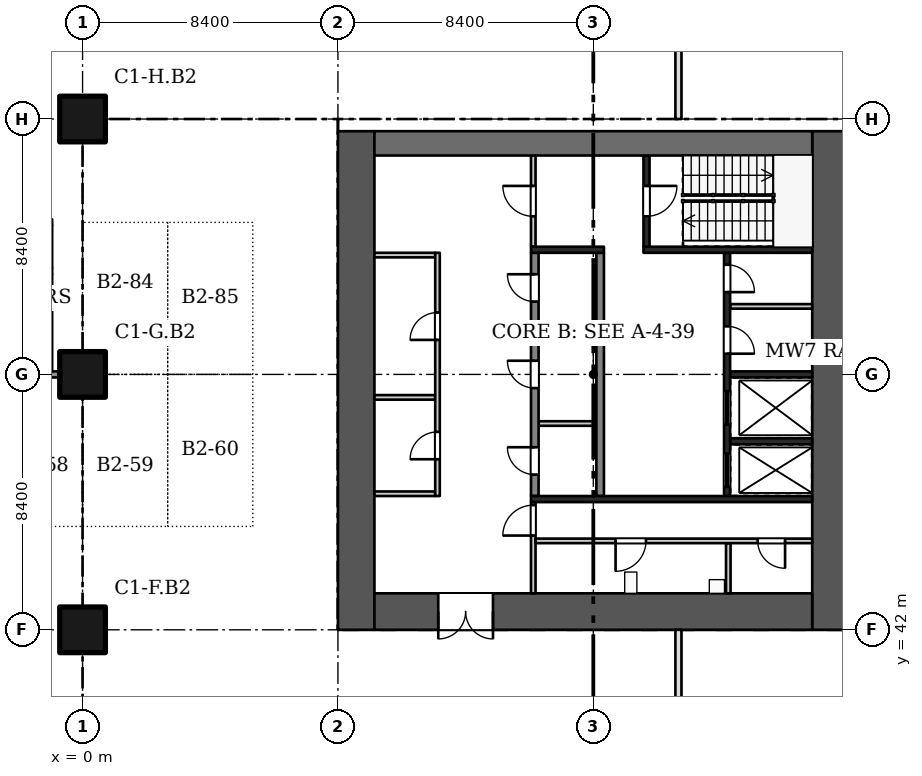
"""IFC4 building model, lengths in metres.
Left out: names, types, materials, properties, quantities, classifications, styles, units other than length and angle.
Written with IfcOpenShell. Run it as: python <this file> out.ifc"""

import sys

from ifc_helpers import new_model, si_unit, direction, frame, frame_2d, origin, origin_2d, place, context, subcontext, project, spatial, rectangle, extrude, element, fill, save


model = new_model("IFC4")
c1 = context("Model", 3, precision=1e-05, world=origin(), true_north=direction((0.0, 1.0)))
c2 = subcontext(c1, "Body", "Model", "MODEL_VIEW")
j1 = project(units=[si_unit("LENGTHUNIT", "METRE"), si_unit("PLANEANGLEUNIT", "RADIAN")], contexts=[c1])
p1 = place(None, origin())
s1 = spatial("IfcSite", under=j1, at=p1, CompositionType="ELEMENT")
p2 = place(p1, origin())
s2 = spatial("IfcBuilding", under=s1, at=p2, CompositionType="ELEMENT")
p3 = place(p2, frame((0.0, 0.0, -8.0)))
s3 = spatial("IfcBuildingStorey", under=s2, at=p3, CompositionType="ELEMENT", Elevation=-8.0)
for number, where, z_axis, x_axis in (
    (1, (0.0, 42.0, 0.0), (0.0, 0.0, 1.0), (1.0, 0.0, 0.0)),
    (2, (0.0, 50.4, 0.0), (0.0, 0.0, 1.0), (1.0, 0.0, 0.0)),
    (3, (0.0, 58.8, 0.0), (0.0, 0.0, 1.0), (1.0, 0.0, 0.0)),
):
    element("IfcColumn", number, at=place(p3, frame(where, z_axis=z_axis, x_axis=x_axis)), inside=s3, PredefinedType="COLUMN", context=c2, shape_type="SweptSolid", body=[
        extrude(rectangle(XDim=1.5, YDim=1.5, at=origin_2d()), origin(), (0.0, 0.0, 1.0), 3.7),
    ])
for number, where, z_axis, x_axis in (
    (4, (9.0, 58.4, 0.0), (0.0, 0.0, 1.0), (0.0, -1.0, 0.0)),
    (5, (24.6, 58.4, 0.0), (0.0, 0.0, 1.0), (0.0, -1.0, 0.0)),
):
    element("IfcWall", number, at=place(p3, frame(where, z_axis=z_axis, x_axis=x_axis)), inside=s3, PredefinedType="SHEAR", context=c2, shape_type="SweptSolid", body=[
        extrude(rectangle(XDim=16.4, YDim=1.2, at=frame_2d((8.2, 0.0))), origin(), (0.0, 0.0, 1.0), 3.7),
    ])
p4 = place(p3, frame((9.6, 58.0, 0.0), z_axis=(0.0, 0.0, 1.0), x_axis=(1.0, 0.0, 0.0)))
e6 = element("IfcWall", 6, at=p4, inside=s3, PredefinedType="SHEAR", context=c2, shape_type="SweptSolid", body=[
    extrude(rectangle(XDim=14.4, YDim=0.8, at=frame_2d((7.2, 0.0))), origin(), (0.0, 0.0, 1.0), 3.7),
])
p5 = place(p3, frame((9.6, 42.6, 0.0), z_axis=(0.0, 0.0, 1.0), x_axis=(1.0, 0.0, 0.0)))
e7 = element("IfcWall", 7, at=p5, inside=s3, PredefinedType="SHEAR", context=c2, shape_type="SweptSolid", body=[
    extrude(rectangle(XDim=14.4, YDim=1.2, at=frame_2d((7.2, 0.0))), origin(), (0.0, 0.0, 1.0), 3.7),
])
p6 = place(p5, frame((2.1, 0.0, 0.0)))
e8 = element("IfcOpeningElement", 8, at=p6, cuts=e7, PredefinedType="OPENING", context=c2, shape_type="SweptSolid", body=[
    extrude(rectangle(XDim=1.8, YDim=2.1, at=frame_2d((0.9, 1.05))), frame((0.0, 0.61, 0.0), z_axis=(0.0, -1.0, 0.0), x_axis=(1.0, 0.0, 0.0)), (0.0, 0.0, 1.0), 1.22),
])
for number, where, z_axis, x_axis in (
    (9, (9.6, 54.325, 0.0), (0.0, 0.0, 1.0), (1.0, 0.0, 0.0)),
    (10, (9.6, 46.475, 0.0), (0.0, 0.0, 1.0), (1.0, 0.0, 0.0)),
    (11, (9.6, 49.645, 0.0), (0.0, 0.0, 1.0), (1.0, 0.0, 0.0)),
):
    element("IfcWall", number, at=place(p3, frame(where, z_axis=z_axis, x_axis=x_axis)), inside=s3, PredefinedType="PARTITIONING", context=c2, shape_type="SweptSolid", body=[
        extrude(rectangle(XDim=2.0, YDim=0.15, at=frame_2d((1.0, 0.0))), origin(), (0.0, 0.0, 1.0), 3.7),
    ])
p7 = place(p3, frame((11.675, 54.4, 0.0), z_axis=(0.0, 0.0, 1.0), x_axis=(0.0, -1.0, 0.0)))
e12 = element("IfcWall", 12, at=p7, inside=s3, PredefinedType="PARTITIONING", context=c2, shape_type="SweptSolid", body=[
    extrude(rectangle(XDim=8.0, YDim=0.15, at=frame_2d((4.0, 0.0))), origin(), (0.0, 0.0, 1.0), 3.7),
])
p8 = place(p7, frame((1.965, 0.0, 0.0)))
e13 = element("IfcOpeningElement", 13, at=p8, cuts=e12, PredefinedType="OPENING", context=c2, shape_type="SweptSolid", body=[
    extrude(rectangle(XDim=0.9, YDim=2.1, at=frame_2d((0.45, 1.05))), frame((0.0, 0.085, 0.0), z_axis=(0.0, -1.0, 0.0), x_axis=(1.0, 0.0, 0.0)), (0.0, 0.0, 1.0), 0.17),
])
p9 = place(p7, frame((5.89, 0.0, 0.0)))
e14 = element("IfcOpeningElement", 14, at=p9, cuts=e12, PredefinedType="OPENING", context=c2, shape_type="SweptSolid", body=[
    extrude(rectangle(XDim=0.9, YDim=2.1, at=frame_2d((0.45, 1.05))), frame((0.0, 0.085, 0.0), z_axis=(0.0, -1.0, 0.0), x_axis=(1.0, 0.0, 0.0)), (0.0, 0.0, 1.0), 0.17),
])
for number, where, z_axis, x_axis in (
    (15, (15.0, 52.015, 0.0), (0.0, 0.0, 1.0), (1.0, 0.0, 0.0)),
    (16, (15.0, 48.785, 0.0), (0.0, 0.0, 1.0), (1.0, 0.0, 0.0)),
):
    element("IfcWall", number, at=place(p3, frame(where, z_axis=z_axis, x_axis=x_axis)), inside=s3, PredefinedType="PARTITIONING", context=c2, shape_type="SweptSolid", body=[
        extrude(rectangle(XDim=1.9, YDim=0.15, at=frame_2d((0.95, 0.0))), origin(), (0.0, 0.0, 1.0), 3.7),
    ])
p10 = place(p3, frame((14.875, 54.4, 0.0), z_axis=(0.0, 0.0, 1.0), x_axis=(0.0, -1.0, 0.0)))
e17 = element("IfcWall", 17, at=p10, inside=s3, PredefinedType="SHEAR", context=c2, shape_type="SweptSolid", body=[
    extrude(rectangle(XDim=8.0, YDim=0.25, at=frame_2d((4.0, 0.0))), origin(), (0.0, 0.0, 1.0), 3.7),
])
p11 = place(p10, frame((0.705, 0.0, 0.0)))
e18 = element("IfcOpeningElement", 18, at=p11, cuts=e17, PredefinedType="OPENING", context=c2, shape_type="SweptSolid", body=[
    extrude(rectangle(XDim=0.9, YDim=2.1, at=frame_2d((0.45, 1.05))), frame((0.0, 0.135, 0.0), z_axis=(0.0, -1.0, 0.0), x_axis=(1.0, 0.0, 0.0)), (0.0, 0.0, 1.0), 0.27),
])
p12 = place(p10, frame((3.55, 0.0, 0.0)))
e19 = element("IfcOpeningElement", 19, at=p12, cuts=e17, PredefinedType="OPENING", context=c2, shape_type="SweptSolid", body=[
    extrude(rectangle(XDim=0.9, YDim=2.1, at=frame_2d((0.45, 1.05))), frame((0.0, 0.135, 0.0), z_axis=(0.0, -1.0, 0.0), x_axis=(1.0, 0.0, 0.0)), (0.0, 0.0, 1.0), 0.27),
])
p13 = place(p10, frame((6.395, 0.0, 0.0)))
e20 = element("IfcOpeningElement", 20, at=p13, cuts=e17, PredefinedType="OPENING", context=c2, shape_type="SweptSolid", body=[
    extrude(rectangle(XDim=0.9, YDim=2.1, at=frame_2d((0.45, 1.05))), frame((0.0, 0.135, 0.0), z_axis=(0.0, -1.0, 0.0), x_axis=(1.0, 0.0, 0.0)), (0.0, 0.0, 1.0), 0.27),
])
p14 = place(p3, frame((17.025, 54.4, 0.0), z_axis=(0.0, 0.0, 1.0), x_axis=(0.0, -1.0, 0.0)))
e21 = element("IfcWall", 21, at=p14, inside=s3, PredefinedType="SHEAR", context=c2, shape_type="SweptSolid", body=[
    extrude(rectangle(XDim=8.0, YDim=0.25, at=frame_2d((4.0, 0.0))), origin(), (0.0, 0.0, 1.0), 3.7),
])
for number, where, z_axis, x_axis in (
    (22, (21.3, 50.4, 0.0), (0.0, 0.0, 1.0), (1.0, 0.0, 0.0)),
    (23, (21.3, 48.2, 0.0), (0.0, 0.0, 1.0), (1.0, 0.0, 0.0)),
):
    element("IfcWall", number, at=place(p3, frame(where, z_axis=z_axis, x_axis=x_axis)), inside=s3, PredefinedType="SHEAR", context=c2, shape_type="SweptSolid", body=[
        extrude(rectangle(XDim=2.7, YDim=0.2, at=frame_2d((1.35, 0.0))), origin(), (0.0, 0.0, 1.0), 3.7),
    ])
p15 = place(p3, frame((21.3, 52.637, 0.0), z_axis=(0.0, 0.0, 1.0), x_axis=(1.0, 0.0, 0.0)))
e24 = element("IfcWall", 24, at=p15, inside=s3, PredefinedType="PARTITIONING", context=c2, shape_type="SweptSolid", body=[
    extrude(rectangle(XDim=2.7, YDim=0.15, at=frame_2d((1.35, 0.0))), origin(), (0.0, 0.0, 1.0), 3.7),
])
p16 = place(p3, frame((21.2, 54.4, 0.0), z_axis=(0.0, 0.0, 1.0), x_axis=(0.0, -1.0, 0.0)))
e25 = element("IfcWall", 25, at=p16, inside=s3, PredefinedType="SHEAR", context=c2, shape_type="SweptSolid", body=[
    extrude(rectangle(XDim=8.0, YDim=0.2, at=frame_2d((4.0, 0.0))), origin(), (0.0, 0.0, 1.0), 3.7),
])
p17 = place(p16, frame((0.394, 0.0, 0.0)))
e26 = element("IfcOpeningElement", 26, at=p17, cuts=e25, PredefinedType="OPENING", context=c2, shape_type="SweptSolid", body=[
    extrude(rectangle(XDim=0.9, YDim=2.1, at=frame_2d((0.45, 1.05))), frame((0.0, 0.11, 0.0), z_axis=(0.0, -1.0, 0.0), x_axis=(1.0, 0.0, 0.0)), (0.0, 0.0, 1.0), 0.22),
])
p18 = place(p16, frame((2.419, 0.0, 0.0)))
e27 = element("IfcOpeningElement", 27, at=p18, cuts=e25, PredefinedType="OPENING", context=c2, shape_type="SweptSolid", body=[
    extrude(rectangle(XDim=0.9, YDim=2.1, at=frame_2d((0.45, 1.05))), frame((0.0, 0.11, 0.0), z_axis=(0.0, -1.0, 0.0), x_axis=(1.0, 0.0, 0.0)), (0.0, 0.0, 1.0), 0.22),
])
p19 = place(p16, frame((4.55, 0.0, 0.0)))
e28 = element("IfcOpeningElement", 28, at=p19, cuts=e25, PredefinedType="OPENING", context=c2, shape_type="SweptSolid", body=[
    extrude(rectangle(XDim=1.1, YDim=2.1, at=frame_2d((0.55, 1.05))), frame((0.0, 0.11, 0.0), z_axis=(0.0, -1.0, 0.0), x_axis=(1.0, 0.0, 0.0)), (0.0, 0.0, 1.0), 0.22),
])
p20 = place(p16, frame((6.6, 0.0, 0.0)))
e29 = element("IfcOpeningElement", 29, at=p20, cuts=e25, PredefinedType="OPENING", context=c2, shape_type="SweptSolid", body=[
    extrude(rectangle(XDim=1.1, YDim=2.1, at=frame_2d((0.55, 1.05))), frame((0.0, 0.11, 0.0), z_axis=(0.0, -1.0, 0.0), x_axis=(1.0, 0.0, 0.0)), (0.0, 0.0, 1.0), 0.22),
])
p21 = place(p3, frame((14.75, 54.5, 0.0), z_axis=(0.0, 0.0, 1.0), x_axis=(1.0, 0.0, 0.0)))
e30 = element("IfcWall", 30, at=p21, inside=s3, PredefinedType="SHEAR", context=c2, shape_type="SweptSolid", body=[
    extrude(rectangle(XDim=2.4, YDim=0.2, at=frame_2d((1.2, 0.0))), origin(), (0.0, 0.0, 1.0), 3.7),
])
p22 = place(p3, frame((18.45, 54.5, 0.0), z_axis=(0.0, 0.0, 1.0), x_axis=(1.0, 0.0, 0.0)))
e31 = element("IfcWall", 31, at=p22, inside=s3, PredefinedType="SHEAR", context=c2, shape_type="SweptSolid", body=[
    extrude(rectangle(XDim=5.55, YDim=0.2, at=frame_2d((2.775, 0.0))), origin(), (0.0, 0.0, 1.0), 3.7),
])
p23 = place(p3, frame((14.825, 57.6, 0.0), z_axis=(0.0, 0.0, 1.0), x_axis=(0.0, -1.0, 0.0)))
e32 = element("IfcWall", 32, at=p23, inside=s3, PredefinedType="PARTITIONING", context=c2, shape_type="SweptSolid", body=[
    extrude(rectangle(XDim=3.0, YDim=0.15, at=frame_2d((1.5, 0.0))), origin(), (0.0, 0.0, 1.0), 3.7),
])
p24 = place(p23, frame((1.0, 0.0, 0.0)))
e33 = element("IfcOpeningElement", 33, at=p24, cuts=e32, PredefinedType="OPENING", context=c2, shape_type="SweptSolid", body=[
    extrude(rectangle(XDim=1.0, YDim=2.1, at=frame_2d((0.5, 1.05))), frame((0.0, 0.085, 0.0), z_axis=(0.0, -1.0, 0.0), x_axis=(1.0, 0.0, 0.0)), (0.0, 0.0, 1.0), 0.17),
])
p25 = place(p3, frame((18.55, 57.6, 0.0), z_axis=(0.0, 0.0, 1.0), x_axis=(0.0, -1.0, 0.0)))
e34 = element("IfcWall", 34, at=p25, inside=s3, PredefinedType="SHEAR", context=c2, shape_type="SweptSolid", body=[
    extrude(rectangle(XDim=3.0, YDim=0.2, at=frame_2d((1.5, 0.0))), origin(), (0.0, 0.0, 1.0), 3.7),
])
p26 = place(p25, frame((1.0, 0.0, 0.0)))
e35 = element("IfcOpeningElement", 35, at=p26, cuts=e34, PredefinedType="OPENING", context=c2, shape_type="SweptSolid", body=[
    extrude(rectangle(XDim=1.0, YDim=2.1, at=frame_2d((0.5, 1.05))), frame((0.0, 0.11, 0.0), z_axis=(0.0, -1.0, 0.0), x_axis=(1.0, 0.0, 0.0)), (0.0, 0.0, 1.0), 0.22),
])
p27 = place(p3, frame((14.75, 46.3, 0.0), z_axis=(0.0, 0.0, 1.0), x_axis=(1.0, 0.0, 0.0)))
e36 = element("IfcWall", 36, at=p27, inside=s3, PredefinedType="SHEAR", context=c2, shape_type="SweptSolid", body=[
    extrude(rectangle(XDim=9.25, YDim=0.2, at=frame_2d((4.625, 0.0))), origin(), (0.0, 0.0, 1.0), 3.7),
])
p28 = place(p3, frame((14.825, 46.2, 0.0), z_axis=(0.0, 0.0, 1.0), x_axis=(0.0, -1.0, 0.0)))
e37 = element("IfcWall", 37, at=p28, inside=s3, PredefinedType="PARTITIONING", context=c2, shape_type="SweptSolid", body=[
    extrude(rectangle(XDim=3.0, YDim=0.15, at=frame_2d((1.5, 0.0))), origin(), (0.0, 0.0, 1.0), 3.7),
])
p29 = place(p28, frame((0.1, 0.0, 0.0)))
e38 = element("IfcOpeningElement", 38, at=p29, cuts=e37, PredefinedType="OPENING", context=c2, shape_type="SweptSolid", body=[
    extrude(rectangle(XDim=1.0, YDim=2.1, at=frame_2d((0.5, 1.05))), frame((0.0, 0.085, 0.0), z_axis=(0.0, -1.0, 0.0), x_axis=(1.0, 0.0, 0.0)), (0.0, 0.0, 1.0), 0.17),
])
p30 = place(p3, frame((21.24, 44.85, 0.0), z_axis=(0.0, 0.0, 1.0), x_axis=(0.0, -1.0, 0.0)))
e39 = element("IfcWall", 39, at=p30, inside=s3, PredefinedType="PARTITIONING", context=c2, shape_type="SweptSolid", body=[
    extrude(rectangle(XDim=1.65, YDim=0.15, at=frame_2d((0.825, 0.0))), origin(), (0.0, 0.0, 1.0), 3.7),
])
p31 = place(p3, frame((14.9, 44.925, 0.0), z_axis=(0.0, 0.0, 1.0), x_axis=(1.0, 0.0, 0.0)))
e40 = element("IfcWall", 40, at=p31, inside=s3, PredefinedType="PARTITIONING", context=c2, shape_type="SweptSolid", body=[
    extrude(rectangle(XDim=9.1, YDim=0.15, at=frame_2d((4.55, 0.0))), origin(), (0.0, 0.0, 1.0), 3.7),
])
p32 = place(p31, frame((2.633, 0.0, 0.0)))
e41 = element("IfcOpeningElement", 41, at=p32, cuts=e40, PredefinedType="OPENING", context=c2, shape_type="SweptSolid", body=[
    extrude(rectangle(XDim=1.0, YDim=2.1, at=frame_2d((0.5, 1.05))), frame((0.0, 0.085, 0.0), z_axis=(0.0, -1.0, 0.0), x_axis=(1.0, 0.0, 0.0)), (0.0, 0.0, 1.0), 0.17),
])
p33 = place(p31, frame((7.308, 0.0, 0.0)))
e42 = element("IfcOpeningElement", 42, at=p33, cuts=e40, PredefinedType="OPENING", context=c2, shape_type="SweptSolid", body=[
    extrude(rectangle(XDim=0.9, YDim=2.1, at=frame_2d((0.45, 1.05))), frame((0.0, 0.085, 0.0), z_axis=(0.0, -1.0, 0.0), x_axis=(1.0, 0.0, 0.0)), (0.0, 0.0, 1.0), 0.17),
])
p34 = place(p3, frame((-2.8, 50.4, 0.0), z_axis=(0.0, 0.0, 1.0), x_axis=(1.0, 0.0, 0.0)))
e43 = element("IfcWall", 43, at=p34, inside=s3, PredefinedType="SOLIDWALL", context=c2, shape_type="SweptSolid", body=[
    extrude(rectangle(XDim=2.05, YDim=0.2, at=frame_2d((1.025, 0.0))), origin(), (0.0, 0.0, 1.0), 3.7),
])
for number, where, z_axis, x_axis in (
    (44, (19.6, 38.6, 0.0), (0.0, 0.0, 1.0), (0.0, 1.0, 0.0)),
    (45, (19.6, 58.8, 0.0), (0.0, 0.0, 1.0), (0.0, 1.0, 0.0)),
):
    element("IfcWall", number, at=place(p3, frame(where, z_axis=z_axis, x_axis=x_axis)), inside=s3, PredefinedType="PARTITIONING", context=c2, shape_type="SweptSolid", body=[
        extrude(rectangle(XDim=3.4, YDim=0.2, at=frame_2d((1.7, 0.0))), origin(), (0.0, 0.0, 1.0), 3.7),
    ])
p35 = place(p6, frame((1.8, 0.0, 0.0), z_axis=(0.0, 0.0, 1.0), x_axis=(-1.0, 0.0, 0.0)))
e46 = element("IfcDoor", 46, at=p35, inside=s3, OperationType="DOUBLE_DOOR_SINGLE_SWING", PredefinedType="DOOR", context=c2, shape_type="SweptSolid", body=[
    extrude(rectangle(XDim=1.8, YDim=2.1, at=frame_2d((0.9, 1.05))), frame((0.0, 0.025, 0.0), z_axis=(0.0, -1.0, 0.0), x_axis=(1.0, 0.0, 0.0)), (0.0, 0.0, 1.0), 0.05),
])
fill(e8, e46)
p36 = place(p8, frame((0.9, 0.0, 0.0), z_axis=(0.0, 0.0, 1.0), x_axis=(-1.0, 0.0, 0.0)))
e47 = element("IfcDoor", 47, at=p36, inside=s3, OperationType="SINGLE_SWING_LEFT", PredefinedType="DOOR", context=c2, shape_type="SweptSolid", body=[
    extrude(rectangle(XDim=0.9, YDim=2.1, at=frame_2d((0.45, 1.05))), frame((0.0, 0.025, 0.0), z_axis=(0.0, -1.0, 0.0), x_axis=(1.0, 0.0, 0.0)), (0.0, 0.0, 1.0), 0.05),
])
fill(e13, e47)
p37 = place(p9, frame((0.9, 0.0, 0.0), z_axis=(0.0, 0.0, 1.0), x_axis=(-1.0, 0.0, 0.0)))
e48 = element("IfcDoor", 48, at=p37, inside=s3, OperationType="SINGLE_SWING_LEFT", PredefinedType="DOOR", context=c2, shape_type="SweptSolid", body=[
    extrude(rectangle(XDim=0.9, YDim=2.1, at=frame_2d((0.45, 1.05))), frame((0.0, 0.025, 0.0), z_axis=(0.0, -1.0, 0.0), x_axis=(1.0, 0.0, 0.0)), (0.0, 0.0, 1.0), 0.05),
])
fill(e14, e48)
p38 = place(p11, frame((0.9, 0.0, 0.0), z_axis=(0.0, 0.0, 1.0), x_axis=(-1.0, 0.0, 0.0)))
e49 = element("IfcDoor", 49, at=p38, inside=s3, OperationType="SINGLE_SWING_RIGHT", PredefinedType="DOOR", context=c2, shape_type="SweptSolid", body=[
    extrude(rectangle(XDim=0.9, YDim=2.1, at=frame_2d((0.45, 1.05))), frame((0.0, 0.025, 0.0), z_axis=(0.0, -1.0, 0.0), x_axis=(1.0, 0.0, 0.0)), (0.0, 0.0, 1.0), 0.05),
])
fill(e18, e49)
p39 = place(p12, frame((0.9, 0.0, 0.0), z_axis=(0.0, 0.0, 1.0), x_axis=(-1.0, 0.0, 0.0)))
e50 = element("IfcDoor", 50, at=p39, inside=s3, OperationType="SINGLE_SWING_RIGHT", PredefinedType="DOOR", context=c2, shape_type="SweptSolid", body=[
    extrude(rectangle(XDim=0.9, YDim=2.1, at=frame_2d((0.45, 1.05))), frame((0.0, 0.025, 0.0), z_axis=(0.0, -1.0, 0.0), x_axis=(1.0, 0.0, 0.0)), (0.0, 0.0, 1.0), 0.05),
])
fill(e19, e50)
p40 = place(p13, frame((0.9, 0.0, 0.0), z_axis=(0.0, 0.0, 1.0), x_axis=(-1.0, 0.0, 0.0)))
e51 = element("IfcDoor", 51, at=p40, inside=s3, OperationType="SINGLE_SWING_RIGHT", PredefinedType="DOOR", context=c2, shape_type="SweptSolid", body=[
    extrude(rectangle(XDim=0.9, YDim=2.1, at=frame_2d((0.45, 1.05))), frame((0.0, 0.025, 0.0), z_axis=(0.0, -1.0, 0.0), x_axis=(1.0, 0.0, 0.0)), (0.0, 0.0, 1.0), 0.05),
])
fill(e20, e51)
p41 = place(p17, origin())
e52 = element("IfcDoor", 52, at=p41, inside=s3, OperationType="SINGLE_SWING_RIGHT", PredefinedType="DOOR", context=c2, shape_type="SweptSolid", body=[
    extrude(rectangle(XDim=0.9, YDim=2.1, at=frame_2d((0.45, 1.05))), frame((0.0, 0.025, 0.0), z_axis=(0.0, -1.0, 0.0), x_axis=(1.0, 0.0, 0.0)), (0.0, 0.0, 1.0), 0.05),
])
fill(e26, e52)
p42 = place(p18, origin())
e53 = element("IfcDoor", 53, at=p42, inside=s3, OperationType="SINGLE_SWING_RIGHT", PredefinedType="DOOR", context=c2, shape_type="SweptSolid", body=[
    extrude(rectangle(XDim=0.9, YDim=2.1, at=frame_2d((0.45, 1.05))), frame((0.0, 0.025, 0.0), z_axis=(0.0, -1.0, 0.0), x_axis=(1.0, 0.0, 0.0)), (0.0, 0.0, 1.0), 0.05),
])
fill(e27, e53)
p43 = place(p19, origin())
e54 = element("IfcDoor", 54, at=p43, inside=s3, OperationType="DOUBLE_DOOR_SLIDING", PredefinedType="DOOR", context=c2, shape_type="SweptSolid", body=[
    extrude(rectangle(XDim=1.1, YDim=2.1, at=frame_2d((0.55, 1.05))), frame((0.0, 0.025, 0.0), z_axis=(0.0, -1.0, 0.0), x_axis=(1.0, 0.0, 0.0)), (0.0, 0.0, 1.0), 0.05),
])
fill(e28, e54)
p44 = place(p20, origin())
e55 = element("IfcDoor", 55, at=p44, inside=s3, OperationType="DOUBLE_DOOR_SLIDING", PredefinedType="DOOR", context=c2, shape_type="SweptSolid", body=[
    extrude(rectangle(XDim=1.1, YDim=2.1, at=frame_2d((0.55, 1.05))), frame((0.0, 0.025, 0.0), z_axis=(0.0, -1.0, 0.0), x_axis=(1.0, 0.0, 0.0)), (0.0, 0.0, 1.0), 0.05),
])
fill(e29, e55)
p45 = place(p24, frame((1.0, 0.0, 0.0), z_axis=(0.0, 0.0, 1.0), x_axis=(-1.0, 0.0, 0.0)))
e56 = element("IfcDoor", 56, at=p45, inside=s3, OperationType="SINGLE_SWING_RIGHT", PredefinedType="DOOR", context=c2, shape_type="SweptSolid", body=[
    extrude(rectangle(XDim=1.0, YDim=2.1, at=frame_2d((0.5, 1.05))), frame((0.0, 0.025, 0.0), z_axis=(0.0, -1.0, 0.0), x_axis=(1.0, 0.0, 0.0)), (0.0, 0.0, 1.0), 0.05),
])
fill(e33, e56)
p46 = place(p26, origin())
e57 = element("IfcDoor", 57, at=p46, inside=s3, OperationType="SINGLE_SWING_LEFT", PredefinedType="DOOR", context=c2, shape_type="SweptSolid", body=[
    extrude(rectangle(XDim=1.0, YDim=2.1, at=frame_2d((0.5, 1.05))), frame((0.0, 0.025, 0.0), z_axis=(0.0, -1.0, 0.0), x_axis=(1.0, 0.0, 0.0)), (0.0, 0.0, 1.0), 0.05),
])
fill(e35, e57)
p47 = place(p29, frame((1.0, 0.0, 0.0), z_axis=(0.0, 0.0, 1.0), x_axis=(-1.0, 0.0, 0.0)))
e58 = element("IfcDoor", 58, at=p47, inside=s3, OperationType="SINGLE_SWING_LEFT", PredefinedType="DOOR", context=c2, shape_type="SweptSolid", body=[
    extrude(rectangle(XDim=1.0, YDim=2.1, at=frame_2d((0.5, 1.05))), frame((0.0, 0.025, 0.0), z_axis=(0.0, -1.0, 0.0), x_axis=(1.0, 0.0, 0.0)), (0.0, 0.0, 1.0), 0.05),
])
fill(e38, e58)
p48 = place(p32, frame((1.0, 0.0, 0.0), z_axis=(0.0, 0.0, 1.0), x_axis=(-1.0, 0.0, 0.0)))
e59 = element("IfcDoor", 59, at=p48, inside=s3, OperationType="SINGLE_SWING_RIGHT", PredefinedType="DOOR", context=c2, shape_type="SweptSolid", body=[
    extrude(rectangle(XDim=1.0, YDim=2.1, at=frame_2d((0.5, 1.05))), frame((0.0, 0.025, 0.0), z_axis=(0.0, -1.0, 0.0), x_axis=(1.0, 0.0, 0.0)), (0.0, 0.0, 1.0), 0.05),
])
fill(e41, e59)
p49 = place(p33, frame((0.9, 0.0, 0.0), z_axis=(0.0, 0.0, 1.0), x_axis=(-1.0, 0.0, 0.0)))
e60 = element("IfcDoor", 60, at=p49, inside=s3, OperationType="SINGLE_SWING_LEFT", PredefinedType="DOOR", context=c2, shape_type="SweptSolid", body=[
    extrude(rectangle(XDim=0.9, YDim=2.1, at=frame_2d((0.45, 1.05))), frame((0.0, 0.025, 0.0), z_axis=(0.0, -1.0, 0.0), x_axis=(1.0, 0.0, 0.0)), (0.0, 0.0, 1.0), 0.05),
])
fill(e42, e60)
save(model, sys.argv[1])
